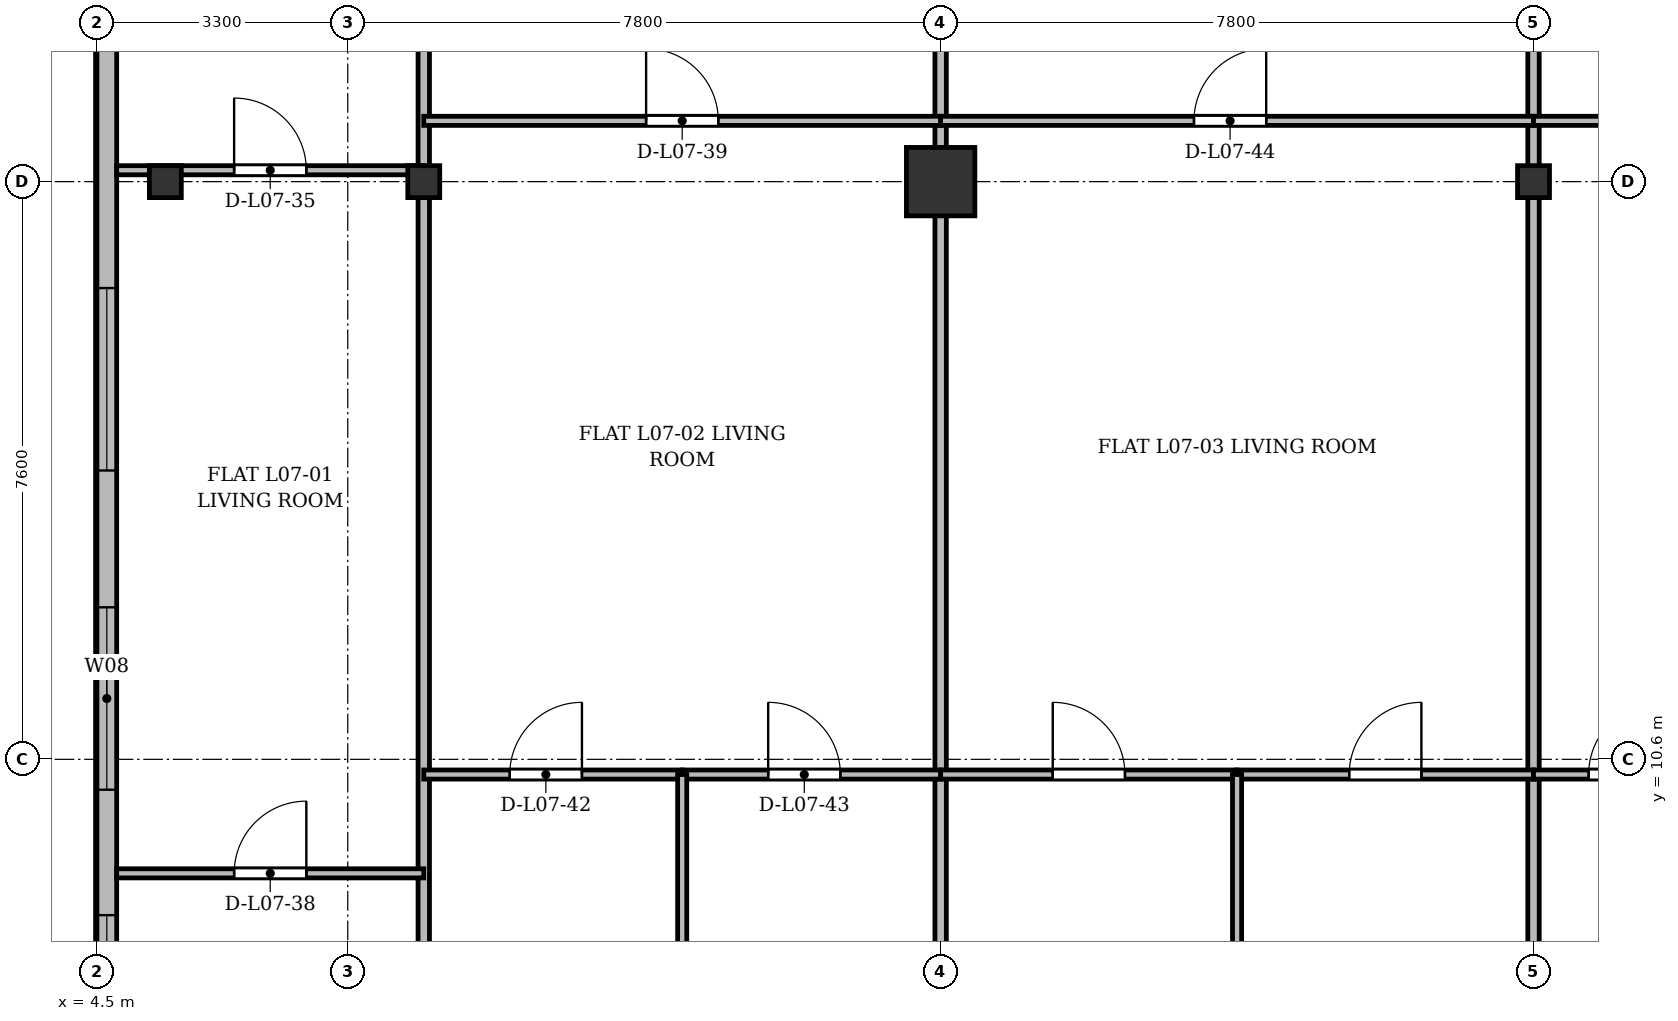
"""IFC4 building model, lengths in metres.
Left out: names, types, materials, properties, quantities, classifications, styles, units other than length and angle.
Written with IfcOpenShell. Run it as: python <this file> out.ifc"""

import sys

from ifc_helpers import new_model, si_unit, direction, frame, frame_2d, origin, origin_2d, place, context, subcontext, project, spatial, rectangle, i_section, extrude, source, transform, mapped, element, fill, save


model = new_model("IFC4")
c1 = context("Model", 3, precision=1e-05, world=origin(), true_north=direction((0.0, 1.0)))
c2 = subcontext(c1, "Body", "Model", "MODEL_VIEW")
j1 = project(units=[si_unit("LENGTHUNIT", "METRE"), si_unit("PLANEANGLEUNIT", "RADIAN")], contexts=[c1])
p1 = place(None, origin())
s1 = spatial("IfcSite", under=j1, at=p1, CompositionType="ELEMENT")
p2 = place(p1, origin())
s2 = spatial("IfcBuilding", under=s1, at=p2, CompositionType="ELEMENT")
p3 = place(p2, frame((0.0, 0.0, 30.7)))
s3 = spatial("IfcBuildingStorey", under=s2, at=p3, CompositionType="ELEMENT", Elevation=30.7)
m1 = source(origin(), c2, "Body", "SweptSolid", [
    extrude(i_section(OverallWidth=0.42, OverallDepth=0.42, WebThickness=0.026, FlangeThickness=0.04, at=origin_2d()), origin(), (0.0, 0.0, 1.0), 3.6),
])
for number, where, z_axis, x_axis in (
    (1, (5.4, 18.2, 0.0), (0.0, 0.0, 1.0), (1.0, 0.0, 0.0)),
    (2, (8.8, 18.2, 0.0), (0.0, 0.0, 1.0), (1.0, 0.0, 0.0)),
):
    element("IfcColumn", number, at=place(p3, frame(where, z_axis=z_axis, x_axis=x_axis)), inside=s3, PredefinedType="COLUMN", context=c2, shape_type="MappedRepresentation", body=[
        mapped(m1, transform((0.0, 0.0, 0.0), x_axis=(1.0, 0.0, 0.0), y_axis=(0.0, 1.0, 0.0), z_axis=(0.0, 0.0, 1.0), scale=1.0)),
    ])
m2 = source(origin(), c2, "Body", "SweptSolid", [
    extrude(rectangle(XDim=0.9, YDim=0.9, at=origin_2d()), origin(), (0.0, 0.0, 1.0), 3.6),
])
p4 = place(p3, frame((15.6, 18.2, 0.0), z_axis=(0.0, 0.0, 1.0), x_axis=(1.0, 0.0, 0.0)))
e3 = element("IfcColumn", 3, at=p4, inside=s3, PredefinedType="COLUMN", context=c2, shape_type="MappedRepresentation", body=[
    mapped(m2, transform((0.0, 0.0, 0.0), x_axis=(1.0, 0.0, 0.0), y_axis=(0.0, 1.0, 0.0), z_axis=(0.0, 0.0, 1.0), scale=1.0)),
])
p5 = place(p3, frame((23.4, 18.2, 0.0), z_axis=(0.0, 0.0, 1.0), x_axis=(1.0, 0.0, 0.0)))
e4 = element("IfcColumn", 4, at=p5, inside=s3, PredefinedType="COLUMN", context=c2, shape_type="MappedRepresentation", body=[
    mapped(m1, transform((0.0, 0.0, 0.0), x_axis=(1.0, 0.0, 0.0), y_axis=(0.0, 1.0, 0.0), z_axis=(0.0, 0.0, 1.0), scale=1.0)),
])
p6 = place(p3, frame((4.63, 5.9, 0.0), z_axis=(0.0, 0.0, 1.0), x_axis=(0.0, 1.0, 0.0)))
e5 = element("IfcWall", 5, at=p6, inside=s3, PredefinedType="SOLIDWALL", context=c2, shape_type="SweptSolid", body=[
    extrude(rectangle(XDim=39.6, YDim=0.26, at=frame_2d((19.8, 0.0))), origin(), (0.0, 0.0, 1.0), 3.34),
])
p7 = place(p6, frame((1.45, 0.0, 0.92)))
e6 = element("IfcOpeningElement", 6, at=p7, cuts=e5, PredefinedType="OPENING", context=c2, shape_type="SweptSolid", body=[
    extrude(rectangle(XDim=1.2, YDim=1.65, at=frame_2d((0.6, 0.825))), frame((0.0, 0.14, 0.0), z_axis=(0.0, -1.0, 0.0), x_axis=(1.0, 0.0, 0.0)), (0.0, 0.0, 1.0), 0.28),
])
p8 = place(p6, frame((4.3, 0.0, 0.92)))
e7 = element("IfcOpeningElement", 7, at=p8, cuts=e5, PredefinedType="OPENING", context=c2, shape_type="SweptSolid", body=[
    extrude(rectangle(XDim=2.4, YDim=2.1, at=frame_2d((1.2, 1.05))), frame((0.0, 0.14, 0.0), z_axis=(0.0, -1.0, 0.0), x_axis=(1.0, 0.0, 0.0)), (0.0, 0.0, 1.0), 0.28),
])
p9 = place(p6, frame((8.5, 0.0, 0.92)))
e8 = element("IfcOpeningElement", 8, at=p9, cuts=e5, PredefinedType="OPENING", context=c2, shape_type="SweptSolid", body=[
    extrude(rectangle(XDim=2.4, YDim=2.1, at=frame_2d((1.2, 1.05))), frame((0.0, 0.14, 0.0), z_axis=(0.0, -1.0, 0.0), x_axis=(1.0, 0.0, 0.0)), (0.0, 0.0, 1.0), 0.28),
])
p10 = place(p6, frame((33.9, 0.0, 0.92)))
e9 = element("IfcOpeningElement", 9, at=p10, cuts=e5, PredefinedType="OPENING", context=c2, shape_type="SweptSolid", body=[
    extrude(rectangle(XDim=1.2, YDim=1.65, at=frame_2d((0.6, 0.825))), frame((0.0, 0.14, 0.0), z_axis=(0.0, -1.0, 0.0), x_axis=(1.0, 0.0, 0.0)), (0.0, 0.0, 1.0), 0.28),
])
p11 = place(p6, frame((37.25, 0.0, 0.92)))
e10 = element("IfcOpeningElement", 10, at=p11, cuts=e5, PredefinedType="OPENING", context=c2, shape_type="SweptSolid", body=[
    extrude(rectangle(XDim=1.2, YDim=1.65, at=frame_2d((0.6, 0.825))), frame((0.0, 0.14, 0.0), z_axis=(0.0, -1.0, 0.0), x_axis=(1.0, 0.0, 0.0)), (0.0, 0.0, 1.0), 0.28),
])
for number, where, z_axis, x_axis in (
    (11, (8.8, 3.145, 0.0), (0.0, 0.0, 1.0), (0.0, 1.0, 0.0)),
    (12, (15.6, 3.145, 0.0), (0.0, 0.0, 1.0), (0.0, 1.0, 0.0)),
    (13, (23.4, 3.145, 0.0), (0.0, 0.0, 1.0), (0.0, 1.0, 0.0)),
):
    element("IfcWall", number, at=place(p3, frame(where, z_axis=z_axis, x_axis=x_axis)), inside=s3, PredefinedType="PARTITIONING", context=c2, shape_type="SweptSolid", body=[
        extrude(rectangle(XDim=24.455, YDim=0.15, at=frame_2d((12.228, 0.0))), origin(), (0.0, 0.0, 1.0), 2.752),
    ])
p12 = place(p3, frame((4.76, 18.35, 0.0), z_axis=(0.0, 0.0, 1.0), x_axis=(1.0, 0.0, 0.0)))
e14 = element("IfcWall", 14, at=p12, inside=s3, PredefinedType="PARTITIONING", context=c2, shape_type="SweptSolid", body=[
    extrude(rectangle(XDim=4.04, YDim=0.12, at=frame_2d((2.02, 0.0))), origin(), (0.0, 0.0, 1.0), 2.69),
])
p13 = place(p12, frame((1.545, 0.0, 0.0)))
e15 = element("IfcOpeningElement", 15, at=p13, cuts=e14, PredefinedType="OPENING", context=c2, shape_type="SweptSolid", body=[
    extrude(rectangle(XDim=0.95, YDim=2.15, at=frame_2d((0.475, 1.075))), frame((0.0, 0.07, 0.0), z_axis=(0.0, -1.0, 0.0), x_axis=(1.0, 0.0, 0.0)), (0.0, 0.0, 1.0), 0.14),
])
p14 = place(p3, frame((4.76, 9.1, 0.0), z_axis=(0.0, 0.0, 1.0), x_axis=(1.0, 0.0, 0.0)))
e16 = element("IfcWall", 16, at=p14, inside=s3, PredefinedType="PARTITIONING", context=c2, shape_type="SweptSolid", body=[
    extrude(rectangle(XDim=4.04, YDim=0.12, at=frame_2d((2.02, 0.0))), origin(), (0.0, 0.0, 1.0), 2.752),
])
p15 = place(p14, frame((1.545, 0.0, 0.0)))
e17 = element("IfcOpeningElement", 17, at=p15, cuts=e16, PredefinedType="OPENING", context=c2, shape_type="SweptSolid", body=[
    extrude(rectangle(XDim=0.95, YDim=2.15, at=frame_2d((0.475, 1.075))), frame((0.0, 0.07, 0.0), z_axis=(0.0, -1.0, 0.0), x_axis=(1.0, 0.0, 0.0)), (0.0, 0.0, 1.0), 0.14),
])
p16 = place(p3, frame((8.8, 19.0, 0.0), z_axis=(0.0, 0.0, 1.0), x_axis=(1.0, 0.0, 0.0)))
e18 = element("IfcWall", 18, at=p16, inside=s3, PredefinedType="PARTITIONING", context=c2, shape_type="SweptSolid", body=[
    extrude(rectangle(XDim=6.8, YDim=0.12, at=frame_2d((3.4, 0.0))), origin(), (0.0, 0.0, 1.0), 2.752),
])
p17 = place(p16, frame((2.925, 0.0, 0.0)))
e19 = element("IfcOpeningElement", 19, at=p17, cuts=e18, PredefinedType="OPENING", context=c2, shape_type="SweptSolid", body=[
    extrude(rectangle(XDim=0.95, YDim=2.15, at=frame_2d((0.475, 1.075))), frame((0.0, 0.07, 0.0), z_axis=(0.0, -1.0, 0.0), x_axis=(1.0, 0.0, 0.0)), (0.0, 0.0, 1.0), 0.14),
])
p18 = place(p3, frame((8.8, 10.4, 0.0), z_axis=(0.0, 0.0, 1.0), x_axis=(1.0, 0.0, 0.0)))
e20 = element("IfcWall", 20, at=p18, inside=s3, PredefinedType="PARTITIONING", context=c2, shape_type="SweptSolid", body=[
    extrude(rectangle(XDim=3.4, YDim=0.12, at=frame_2d((1.7, 0.0))), origin(), (0.0, 0.0, 1.0), 2.752),
])
p19 = place(p18, frame((1.131, 0.0, 0.0)))
e21 = element("IfcOpeningElement", 21, at=p19, cuts=e20, PredefinedType="OPENING", context=c2, shape_type="SweptSolid", body=[
    extrude(rectangle(XDim=0.95, YDim=2.15, at=frame_2d((0.475, 1.075))), frame((0.0, 0.07, 0.0), z_axis=(0.0, -1.0, 0.0), x_axis=(1.0, 0.0, 0.0)), (0.0, 0.0, 1.0), 0.14),
])
p20 = place(p3, frame((12.2, 10.4, 0.0), z_axis=(0.0, 0.0, 1.0), x_axis=(1.0, 0.0, 0.0)))
e22 = element("IfcWall", 22, at=p20, inside=s3, PredefinedType="PARTITIONING", context=c2, shape_type="SweptSolid", body=[
    extrude(rectangle(XDim=3.4, YDim=0.12, at=frame_2d((1.7, 0.0))), origin(), (0.0, 0.0, 1.0), 2.752),
])
p21 = place(p20, frame((1.131, 0.0, 0.0)))
e23 = element("IfcOpeningElement", 23, at=p21, cuts=e22, PredefinedType="OPENING", context=c2, shape_type="SweptSolid", body=[
    extrude(rectangle(XDim=0.95, YDim=2.15, at=frame_2d((0.475, 1.075))), frame((0.0, 0.07, 0.0), z_axis=(0.0, -1.0, 0.0), x_axis=(1.0, 0.0, 0.0)), (0.0, 0.0, 1.0), 0.14),
])
p22 = place(p3, frame((12.2, 3.145, 0.0), z_axis=(0.0, 0.0, 1.0), x_axis=(0.0, 1.0, 0.0)))
e24 = element("IfcWall", 24, at=p22, inside=s3, PredefinedType="PARTITIONING", context=c2, shape_type="SweptSolid", body=[
    extrude(rectangle(XDim=7.255, YDim=0.12, at=frame_2d((3.627, 0.0))), origin(), (0.0, 0.0, 1.0), 2.69),
])
p23 = place(p3, frame((15.6, 19.0, 0.0), z_axis=(0.0, 0.0, 1.0), x_axis=(1.0, 0.0, 0.0)))
e25 = element("IfcWall", 25, at=p23, inside=s3, PredefinedType="PARTITIONING", context=c2, shape_type="SweptSolid", body=[
    extrude(rectangle(XDim=7.8, YDim=0.12, at=frame_2d((3.9, 0.0))), origin(), (0.0, 0.0, 1.0), 2.752),
])
p24 = place(p23, frame((3.333, 0.0, 0.0)))
e26 = element("IfcOpeningElement", 26, at=p24, cuts=e25, PredefinedType="OPENING", context=c2, shape_type="SweptSolid", body=[
    extrude(rectangle(XDim=0.95, YDim=2.15, at=frame_2d((0.475, 1.075))), frame((0.0, 0.07, 0.0), z_axis=(0.0, -1.0, 0.0), x_axis=(1.0, 0.0, 0.0)), (0.0, 0.0, 1.0), 0.14),
])
p25 = place(p3, frame((15.6, 10.4, 0.0), z_axis=(0.0, 0.0, 1.0), x_axis=(1.0, 0.0, 0.0)))
e27 = element("IfcWall", 27, at=p25, inside=s3, PredefinedType="PARTITIONING", context=c2, shape_type="SweptSolid", body=[
    extrude(rectangle(XDim=3.9, YDim=0.12, at=frame_2d((1.95, 0.0))), origin(), (0.0, 0.0, 1.0), 2.752),
])
p26 = place(p25, frame((1.475, 0.0, 0.0)))
e28 = element("IfcOpeningElement", 28, at=p26, cuts=e27, PredefinedType="OPENING", context=c2, shape_type="SweptSolid", body=[
    extrude(rectangle(XDim=0.95, YDim=2.15, at=frame_2d((0.475, 1.075))), frame((0.0, 0.07, 0.0), z_axis=(0.0, -1.0, 0.0), x_axis=(1.0, 0.0, 0.0)), (0.0, 0.0, 1.0), 0.14),
])
p27 = place(p3, frame((19.5, 10.4, 0.0), z_axis=(0.0, 0.0, 1.0), x_axis=(1.0, 0.0, 0.0)))
e29 = element("IfcWall", 29, at=p27, inside=s3, PredefinedType="PARTITIONING", context=c2, shape_type="SweptSolid", body=[
    extrude(rectangle(XDim=3.9, YDim=0.12, at=frame_2d((1.95, 0.0))), origin(), (0.0, 0.0, 1.0), 2.752),
])
p28 = place(p27, frame((1.475, 0.0, 0.0)))
e30 = element("IfcOpeningElement", 30, at=p28, cuts=e29, PredefinedType="OPENING", context=c2, shape_type="SweptSolid", body=[
    extrude(rectangle(XDim=0.95, YDim=2.15, at=frame_2d((0.475, 1.075))), frame((0.0, 0.07, 0.0), z_axis=(0.0, -1.0, 0.0), x_axis=(1.0, 0.0, 0.0)), (0.0, 0.0, 1.0), 0.14),
])
p29 = place(p3, frame((19.5, 3.145, 0.0), z_axis=(0.0, 0.0, 1.0), x_axis=(0.0, 1.0, 0.0)))
e31 = element("IfcWall", 31, at=p29, inside=s3, PredefinedType="PARTITIONING", context=c2, shape_type="SweptSolid", body=[
    extrude(rectangle(XDim=7.255, YDim=0.12, at=frame_2d((3.627, 0.0))), origin(), (0.0, 0.0, 1.0), 2.69),
])
p30 = place(p3, frame((23.4, 19.0, 0.0), z_axis=(0.0, 0.0, 1.0), x_axis=(1.0, 0.0, 0.0)))
e32 = element("IfcWall", 32, at=p30, inside=s3, PredefinedType="PARTITIONING", context=c2, shape_type="SweptSolid", body=[
    extrude(rectangle(XDim=7.2, YDim=0.12, at=frame_2d((3.6, 0.0))), origin(), (0.0, 0.0, 1.0), 2.752),
])
p31 = place(p30, frame((3.125, 0.0, 0.0)))
e33 = element("IfcOpeningElement", 33, at=p31, cuts=e32, PredefinedType="OPENING", context=c2, shape_type="SweptSolid", body=[
    extrude(rectangle(XDim=0.95, YDim=2.15, at=frame_2d((0.475, 1.075))), frame((0.0, 0.07, 0.0), z_axis=(0.0, -1.0, 0.0), x_axis=(1.0, 0.0, 0.0)), (0.0, 0.0, 1.0), 0.14),
])
p32 = place(p3, frame((23.4, 10.4, 0.0), z_axis=(0.0, 0.0, 1.0), x_axis=(1.0, 0.0, 0.0)))
e34 = element("IfcWall", 34, at=p32, inside=s3, PredefinedType="PARTITIONING", context=c2, shape_type="SweptSolid", body=[
    extrude(rectangle(XDim=2.4, YDim=0.12, at=frame_2d((1.2, 0.0))), origin(), (0.0, 0.0, 1.0), 2.752),
])
p33 = place(p32, frame((0.725, 0.0, 0.0)))
e35 = element("IfcOpeningElement", 35, at=p33, cuts=e34, PredefinedType="OPENING", context=c2, shape_type="SweptSolid", body=[
    extrude(rectangle(XDim=0.95, YDim=2.15, at=frame_2d((0.475, 1.075))), frame((0.0, 0.07, 0.0), z_axis=(0.0, -1.0, 0.0), x_axis=(1.0, 0.0, 0.0)), (0.0, 0.0, 1.0), 0.14),
])
m3 = source(origin(), c2, "Body", "SweptSolid", [
    extrude(rectangle(XDim=1.2, YDim=1.65, at=frame_2d((0.6, 0.825))), frame((0.0, 0.03, 0.0), z_axis=(0.0, -1.0, 0.0), x_axis=(1.0, 0.0, 0.0)), (0.0, 0.0, 1.0), 0.06),
])
p34 = place(p7, origin())
e36 = element("IfcWindow", 36, at=p34, inside=s3, PartitioningType="SINGLE_PANEL", PredefinedType="WINDOW", context=c2, shape_type="MappedRepresentation", body=[
    mapped(m3, transform((0.0, 0.0, 0.0), x_axis=(1.0, 0.0, 0.0), y_axis=(0.0, 1.0, 0.0), z_axis=(0.0, 0.0, 1.0), scale=1.0)),
])
fill(e6, e36)
m4 = source(origin(), c2, "Body", "SweptSolid", [
    extrude(rectangle(XDim=2.4, YDim=2.1, at=frame_2d((1.2, 1.05))), frame((0.0, 0.03, 0.0), z_axis=(0.0, -1.0, 0.0), x_axis=(1.0, 0.0, 0.0)), (0.0, 0.0, 1.0), 0.06),
])
p35 = place(p8, origin())
e37 = element("IfcWindow", 37, at=p35, inside=s3, PartitioningType="SINGLE_PANEL", PredefinedType="WINDOW", context=c2, shape_type="MappedRepresentation", body=[
    mapped(m4, transform((0.0, 0.0, 0.0), x_axis=(1.0, 0.0, 0.0), y_axis=(0.0, 1.0, 0.0), z_axis=(0.0, 0.0, 1.0), scale=1.0)),
])
fill(e7, e37)
p36 = place(p9, origin())
e38 = element("IfcWindow", 38, at=p36, inside=s3, PartitioningType="SINGLE_PANEL", PredefinedType="WINDOW", context=c2, shape_type="MappedRepresentation", body=[
    mapped(m4, transform((0.0, 0.0, 0.0), x_axis=(1.0, 0.0, 0.0), y_axis=(0.0, 1.0, 0.0), z_axis=(0.0, 0.0, 1.0), scale=1.0)),
])
fill(e8, e38)
m5 = source(origin(), c2, "Body", "SweptSolid", [
    extrude(rectangle(XDim=0.95, YDim=2.15, at=frame_2d((0.475, 1.075))), frame((0.0, 0.025, 0.0), z_axis=(0.0, -1.0, 0.0), x_axis=(1.0, 0.0, 0.0)), (0.0, 0.0, 1.0), 0.05),
])
p37 = place(p13, origin())
e39 = element("IfcDoor", 39, at=p37, inside=s3, OperationType="SINGLE_SWING_LEFT", PredefinedType="DOOR", context=c2, shape_type="MappedRepresentation", body=[
    mapped(m5, transform((0.0, 0.0, 0.0), x_axis=(1.0, 0.0, 0.0), y_axis=(0.0, 1.0, 0.0), z_axis=(0.0, 0.0, 1.0), scale=1.0)),
])
fill(e15, e39)
p38 = place(p15, origin())
e40 = element("IfcDoor", 40, at=p38, inside=s3, OperationType="SINGLE_SWING_RIGHT", PredefinedType="DOOR", context=c2, shape_type="MappedRepresentation", body=[
    mapped(m5, transform((0.0, 0.0, 0.0), x_axis=(1.0, 0.0, 0.0), y_axis=(0.0, 1.0, 0.0), z_axis=(0.0, 0.0, 1.0), scale=1.0)),
])
fill(e17, e40)
p39 = place(p17, origin())
e41 = element("IfcDoor", 41, at=p39, inside=s3, OperationType="SINGLE_SWING_LEFT", PredefinedType="DOOR", context=c2, shape_type="MappedRepresentation", body=[
    mapped(m5, transform((0.0, 0.0, 0.0), x_axis=(1.0, 0.0, 0.0), y_axis=(0.0, 1.0, 0.0), z_axis=(0.0, 0.0, 1.0), scale=1.0)),
])
fill(e19, e41)
p40 = place(p19, origin())
e42 = element("IfcDoor", 42, at=p40, inside=s3, OperationType="SINGLE_SWING_RIGHT", PredefinedType="DOOR", context=c2, shape_type="MappedRepresentation", body=[
    mapped(m5, transform((0.0, 0.0, 0.0), x_axis=(1.0, 0.0, 0.0), y_axis=(0.0, 1.0, 0.0), z_axis=(0.0, 0.0, 1.0), scale=1.0)),
])
fill(e21, e42)
p41 = place(p21, origin())
e43 = element("IfcDoor", 43, at=p41, inside=s3, OperationType="SINGLE_SWING_LEFT", PredefinedType="DOOR", context=c2, shape_type="MappedRepresentation", body=[
    mapped(m5, transform((0.0, 0.0, 0.0), x_axis=(1.0, 0.0, 0.0), y_axis=(0.0, 1.0, 0.0), z_axis=(0.0, 0.0, 1.0), scale=1.0)),
])
fill(e23, e43)
p42 = place(p24, origin())
e44 = element("IfcDoor", 44, at=p42, inside=s3, OperationType="SINGLE_SWING_RIGHT", PredefinedType="DOOR", context=c2, shape_type="MappedRepresentation", body=[
    mapped(m5, transform((0.0, 0.0, 0.0), x_axis=(1.0, 0.0, 0.0), y_axis=(0.0, 1.0, 0.0), z_axis=(0.0, 0.0, 1.0), scale=1.0)),
])
fill(e26, e44)
p43 = place(p26, origin())
e45 = element("IfcDoor", 45, at=p43, inside=s3, OperationType="SINGLE_SWING_LEFT", PredefinedType="DOOR", context=c2, shape_type="MappedRepresentation", body=[
    mapped(m5, transform((0.0, 0.0, 0.0), x_axis=(1.0, 0.0, 0.0), y_axis=(0.0, 1.0, 0.0), z_axis=(0.0, 0.0, 1.0), scale=1.0)),
])
fill(e28, e45)
p44 = place(p28, origin())
e46 = element("IfcDoor", 46, at=p44, inside=s3, OperationType="SINGLE_SWING_RIGHT", PredefinedType="DOOR", context=c2, shape_type="MappedRepresentation", body=[
    mapped(m5, transform((0.0, 0.0, 0.0), x_axis=(1.0, 0.0, 0.0), y_axis=(0.0, 1.0, 0.0), z_axis=(0.0, 0.0, 1.0), scale=1.0)),
])
fill(e30, e46)
p45 = place(p33, origin())
e47 = element("IfcDoor", 47, at=p45, inside=s3, OperationType="SINGLE_SWING_RIGHT", PredefinedType="DOOR", context=c2, shape_type="MappedRepresentation", body=[
    mapped(m5, transform((0.0, 0.0, 0.0), x_axis=(1.0, 0.0, 0.0), y_axis=(0.0, 1.0, 0.0), z_axis=(0.0, 0.0, 1.0), scale=1.0)),
])
fill(e35, e47)
save(model, sys.argv[1])
